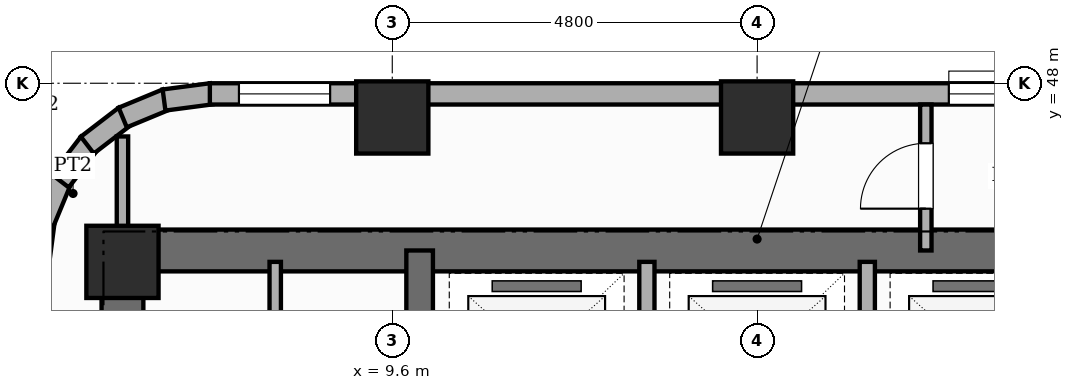
"""IFC4 building model, lengths in metres.
Left out: names, types, materials, properties, quantities, classifications, styles, units other than length and angle.
Written with IfcOpenShell. Run it as: python <this file> out.ifc"""

import sys

from ifc_helpers import new_model, si_unit, direction, frame, frame_2d, origin, origin_2d, place, context, subcontext, project, spatial, rectangle, extrude, element, fill, save


model = new_model("IFC4")
c1 = context("Model", 3, precision=1e-05, world=origin(), true_north=direction((0.0, 1.0)))
c2 = subcontext(c1, "Body", "Model", "MODEL_VIEW")
j1 = project(units=[si_unit("LENGTHUNIT", "METRE"), si_unit("PLANEANGLEUNIT", "RADIAN")], contexts=[c1])
p1 = place(None, origin())
s1 = spatial("IfcSite", under=j1, at=p1, CompositionType="ELEMENT")
p2 = place(p1, origin())
s2 = spatial("IfcBuilding", under=s1, at=p2, CompositionType="ELEMENT")
p3 = place(p2, frame((0.0, 0.0, 193.6)))
s3 = spatial("IfcBuildingStorey", under=s2, at=p3, CompositionType="ELEMENT", Elevation=193.6)
p4 = place(p3, frame((6.05, 30.625, 0.0), z_axis=(0.0, 0.0, 1.0), x_axis=(0.0, 1.0, 0.0)))
e1 = element("IfcWall", 1, at=p4, inside=s3, PredefinedType="SHEAR", context=c2, shape_type="SweptSolid", body=[
    extrude(rectangle(XDim=15.45, YDim=0.55, at=frame_2d((7.725, 0.0))), origin(), (0.0, 0.0, 1.0), 4.8),
])
p5 = place(p3, frame((6.05, 45.8, 0.0), z_axis=(0.0, 0.0, 1.0), x_axis=(1.0, 0.0, 0.0)))
e2 = element("IfcWall", 2, at=p5, inside=s3, PredefinedType="SHEAR", context=c2, shape_type="SweptSolid", body=[
    extrude(rectangle(XDim=16.7, YDim=0.55, at=frame_2d((8.35, 0.0))), origin(), (0.0, 0.0, 1.0), 4.8),
])
p6 = place(p3, frame((9.96, 30.9, 0.0), z_axis=(0.0, 0.0, 1.0), x_axis=(0.0, 1.0, 0.0)))
e3 = element("IfcWall", 3, at=p6, inside=s3, PredefinedType="SHEAR", context=c2, shape_type="SweptSolid", body=[
    extrude(rectangle(XDim=14.9, YDim=0.35, at=frame_2d((7.45, 0.0))), origin(), (0.0, 0.0, 1.0), 4.8),
])
p7 = place(p6, frame((0.65, 0.0, 0.0)))
e4 = element("IfcOpeningElement", 4, at=p7, cuts=e3, PredefinedType="OPENING", context=c2, shape_type="SweptSolid", body=[
    extrude(rectangle(XDim=0.95, YDim=2.1, at=frame_2d((0.475, 1.05))), frame((0.0, 0.185, 0.0), z_axis=(0.0, -1.0, 0.0), x_axis=(1.0, 0.0, 0.0)), (0.0, 0.0, 1.0), 0.37),
])
p8 = place(p6, frame((10.45, 0.0, 0.0)))
e5 = element("IfcOpeningElement", 5, at=p8, cuts=e3, PredefinedType="OPENING", context=c2, shape_type="SweptSolid", body=[
    extrude(rectangle(XDim=1.0, YDim=2.15, at=frame_2d((0.5, 1.075))), frame((0.0, 0.185, 0.0), z_axis=(0.0, -1.0, 0.0), x_axis=(1.0, 0.0, 0.0)), (0.0, 0.0, 1.0), 0.37),
])
for number, where, z_axis, x_axis in (
    (6, (6.05, 45.65, 0.0), (0.0, 0.0, 1.0), (1.0, 0.0, 0.0)),
    (7, (9.6, 47.55, 0.0), (0.0, 0.0, 1.0), (1.0, 0.0, 0.0)),
    (8, (14.4, 47.55, 0.0), (0.0, 0.0, 1.0), (1.0, 0.0, 0.0)),
):
    element("IfcColumn", number, at=place(p3, frame(where, z_axis=z_axis, x_axis=x_axis)), inside=s3, PredefinedType="COLUMN", context=c2, shape_type="SweptSolid", body=[
        extrude(rectangle(XDim=0.95, YDim=0.95, at=origin_2d()), origin(), (0.0, 0.0, 1.0), 4.8),
    ])
for number, where, z_axis, x_axis in (
    (9, (4.939, 45.582, 0.0), (0.0, 0.0, 1.0), (0.131, 0.991, 0.0)),
    (10, (5.011, 46.167, 0.0), (0.0, 0.0, 1.0), (0.383, 0.924, 0.0)),
    (11, (5.233, 46.715, 0.0), (0.0, 0.0, 1.0), (0.609, 0.793, 0.0)),
    (12, (5.588, 47.186, 0.0), (0.0, 0.0, 1.0), (0.793, 0.609, 0.0)),
):
    element("IfcWall", number, at=place(p3, frame(where, z_axis=z_axis, x_axis=x_axis)), inside=s3, PredefinedType="STANDARD", context=c2, shape_type="SweptSolid", body=[
        extrude(rectangle(XDim=0.626, YDim=0.28, at=frame_2d((0.313, 0.0))), origin(), (0.0, 0.0, 1.0), 4.5),
    ])
p9 = place(p3, frame((6.054, 47.549, 0.0), z_axis=(0.0, 0.0, 1.0), x_axis=(0.923974080304, 0.382455093999, 0.0)))
e13 = element("IfcWall", 13, at=p9, inside=s3, PredefinedType="STANDARD", context=c2, shape_type="SweptSolid", body=[
    extrude(rectangle(XDim=0.626, YDim=0.28, at=frame_2d((0.313, 0.0))), origin(), (0.0, 0.0, 1.0), 4.5),
])
p10 = place(p3, frame((6.597, 47.779, 0.0), z_axis=(0.0, 0.0, 1.0), x_axis=(0.9914410257, 0.130555323746, 0.0)))
e14 = element("IfcWall", 14, at=p10, inside=s3, PredefinedType="STANDARD", context=c2, shape_type="SweptSolid", body=[
    extrude(rectangle(XDim=0.626, YDim=0.28, at=frame_2d((0.313, 0.0))), origin(), (0.0, 0.0, 1.0), 4.5),
])
p11 = place(p3, frame((7.2, 47.86, 0.0), z_axis=(0.0, 0.0, 1.0), x_axis=(1.0, 0.0, 0.0)))
e15 = element("IfcWall", 15, at=p11, inside=s3, PredefinedType="STANDARD", context=c2, shape_type="SweptSolid", body=[
    extrude(rectangle(XDim=43.2, YDim=0.28, at=frame_2d((21.6, 0.0))), origin(), (0.0, 0.0, 1.0), 3.78),
])
p12 = place(p11, frame((18.802, 0.0, 0.8)))
e16 = element("IfcOpeningElement", 16, at=p12, cuts=e15, PredefinedType="OPENING", context=c2, shape_type="SweptSolid", body=[
    extrude(rectangle(XDim=1.8, YDim=2.1, at=frame_2d((0.9, 1.05))), frame((0.0, 0.15, 0.0), z_axis=(0.0, -1.0, 0.0), x_axis=(1.0, 0.0, 0.0)), (0.0, 0.0, 1.0), 0.3),
])
p13 = place(p11, frame((0.383, 0.0, 0.8)))
e17 = element("IfcOpeningElement", 17, at=p13, cuts=e15, PredefinedType="OPENING", context=c2, shape_type="SweptSolid", body=[
    extrude(rectangle(XDim=1.2, YDim=1.8, at=frame_2d((0.6, 0.9))), frame((0.0, 0.15, 0.0), z_axis=(0.0, -1.0, 0.0), x_axis=(1.0, 0.0, 0.0)), (0.0, 0.0, 1.0), 0.3),
])
p14 = place(p11, frame((9.722, 0.0, 0.8)))
e18 = element("IfcOpeningElement", 18, at=p14, cuts=e15, PredefinedType="OPENING", context=c2, shape_type="SweptSolid", body=[
    extrude(rectangle(XDim=1.5, YDim=2.1, at=frame_2d((0.75, 1.05))), frame((0.0, 0.15, 0.0), z_axis=(0.0, -1.0, 0.0), x_axis=(1.0, 0.0, 0.0)), (0.0, 0.0, 1.0), 0.3),
])
for number, where, z_axis, x_axis in (
    (19, (12.95, 43.1, 0.0), (0.0, 0.0, 1.0), (0.0, 1.0, 0.0)),
    (20, (15.85, 43.1, 0.0), (0.0, 0.0, 1.0), (0.0, 1.0, 0.0)),
):
    element("IfcWall", number, at=place(p3, frame(where, z_axis=z_axis, x_axis=x_axis)), inside=s3, PredefinedType="POLYGONAL", context=c2, shape_type="SweptSolid", body=[
        extrude(rectangle(XDim=2.55, YDim=0.2, at=frame_2d((1.275, 0.0))), origin(), (0.0, 0.0, 1.0), 4.5),
    ])
p15 = place(p3, frame((8.06, 43.05, 0.0), z_axis=(0.0, 0.0, 1.0), x_axis=(0.0, 1.0, 0.0)))
e21 = element("IfcWall", 21, at=p15, inside=s3, PredefinedType="PARTITIONING", context=c2, shape_type="SweptSolid", body=[
    extrude(rectangle(XDim=2.6, YDim=0.15, at=frame_2d((1.3, 0.0))), origin(), (0.0, 0.0, 1.0), 4.5),
])
p16 = place(p3, frame((6.05, 45.8, 0.0), z_axis=(0.0, 0.0, 1.0), x_axis=(0.0, 1.0, 0.0)))
e22 = element("IfcWall", 22, at=p16, inside=s3, PredefinedType="PARTITIONING", context=c2, shape_type="SweptSolid", body=[
    extrude(rectangle(XDim=1.5, YDim=0.15, at=frame_2d((0.75, 0.0))), origin(), (0.0, 0.0, 1.0), 4.5),
])
p17 = place(p3, frame((16.62, 45.8, 0.0), z_axis=(0.0, 0.0, 1.0), x_axis=(0.0, 1.0, 0.0)))
e23 = element("IfcWall", 23, at=p17, inside=s3, PredefinedType="PARTITIONING", context=c2, shape_type="SweptSolid", body=[
    extrude(rectangle(XDim=1.92, YDim=0.15, at=frame_2d((0.96, 0.0))), origin(), (0.0, 0.0, 1.0), 4.5),
])
p18 = place(p17, frame((0.55, 0.0, 0.0)))
e24 = element("IfcOpeningElement", 24, at=p18, cuts=e23, PredefinedType="OPENING", context=c2, shape_type="SweptSolid", body=[
    extrude(rectangle(XDim=0.86, YDim=2.1, at=frame_2d((0.43, 1.05))), frame((0.0, 0.085, 0.0), z_axis=(0.0, -1.0, 0.0), x_axis=(1.0, 0.0, 0.0)), (0.0, 0.0, 1.0), 0.17),
])
p19 = place(p13, origin())
e25 = element("IfcWindow", 25, at=p19, inside=s3, PartitioningType="SINGLE_PANEL", PredefinedType="WINDOW", context=c2, shape_type="SweptSolid", body=[
    extrude(rectangle(XDim=1.2, YDim=1.8, at=frame_2d((0.6, 0.9))), frame((0.0, 0.03, 0.0), z_axis=(0.0, -1.0, 0.0), x_axis=(1.0, 0.0, 0.0)), (0.0, 0.0, 1.0), 0.06),
])
fill(e17, e25)
p20 = place(p14, origin())
e26 = element("IfcWindow", 26, at=p20, inside=s3, PartitioningType="SINGLE_PANEL", PredefinedType="WINDOW", context=c2, shape_type="SweptSolid", body=[
    extrude(rectangle(XDim=1.5, YDim=2.1, at=frame_2d((0.75, 1.05))), frame((0.0, 0.03, 0.0), z_axis=(0.0, -1.0, 0.0), x_axis=(1.0, 0.0, 0.0)), (0.0, 0.0, 1.0), 0.06),
])
fill(e18, e26)
p21 = place(p18, origin())
e27 = element("IfcDoor", 27, at=p21, inside=s3, OperationType="SINGLE_SWING_LEFT", PredefinedType="DOOR", context=c2, shape_type="SweptSolid", body=[
    extrude(rectangle(XDim=0.86, YDim=2.1, at=frame_2d((0.43, 1.05))), frame((0.0, 0.025, 0.0), z_axis=(0.0, -1.0, 0.0), x_axis=(1.0, 0.0, 0.0)), (0.0, 0.0, 1.0), 0.05),
])
fill(e24, e27)
save(model, sys.argv[1])
